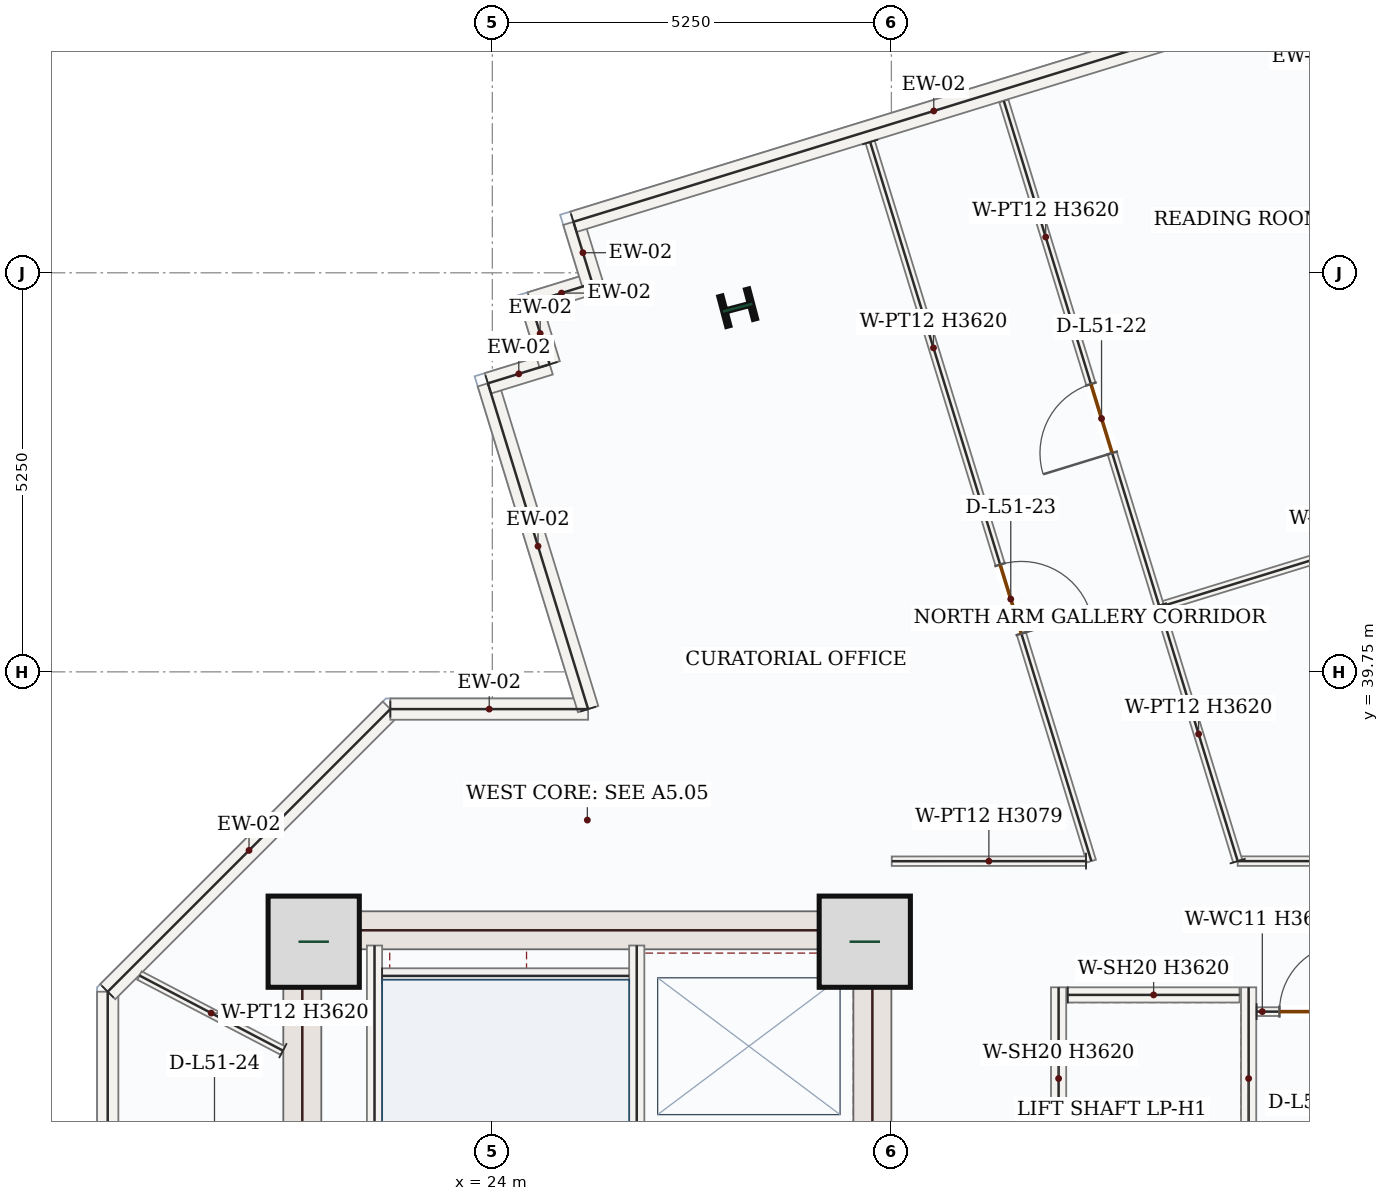
"""IFC4 building model, lengths in metres.
Left out: names, types, materials, properties, quantities, classifications, styles, units other than length and angle.
Written with IfcOpenShell. Run it as: python <this file> out.ifc"""

import sys

from ifc_helpers import new_model, si_unit, direction, frame, frame_2d, origin, origin_2d, place, context, subcontext, project, spatial, rectangle, i_section, extrude, source, transform, mapped, element, fill, save


model = new_model("IFC4")
c1 = context("Model", 3, precision=1e-05, world=origin(), true_north=direction((0.0, 1.0)))
c2 = subcontext(c1, "Body", "Model", "MODEL_VIEW")
j1 = project(units=[si_unit("LENGTHUNIT", "METRE"), si_unit("PLANEANGLEUNIT", "RADIAN")], contexts=[c1])
p1 = place(None, origin())
s1 = spatial("IfcSite", under=j1, at=p1, CompositionType="ELEMENT")
p2 = place(p1, origin())
s2 = spatial("IfcBuilding", under=s1, at=p2, CompositionType="ELEMENT")
p3 = place(p2, frame((0.0, 0.0, 217.5)))
s3 = spatial("IfcBuildingStorey", under=s2, at=p3, CompositionType="ELEMENT", Elevation=217.5)
m1 = source(origin(), c2, "Body", "SweptSolid", [
    extrude(rectangle(XDim=8.55, YDim=0.5, at=frame_2d((4.275, 0.0))), origin(), (0.0, 0.0, 1.0), 3.62),
])
p4 = place(p3, frame((21.5, 28.05, 0.0), z_axis=(0.0, 0.0, 1.0), x_axis=(0.0, 1.0, 0.0)))
e1 = element("IfcWall", 1, at=p4, inside=s3, PredefinedType="SHEAR", context=c2, shape_type="MappedRepresentation", body=[
    mapped(m1, transform((0.0, 0.0, 0.0), x_axis=(1.0, 0.0, 0.0), y_axis=(0.0, 1.0, 0.0), z_axis=(0.0, 0.0, 1.0), scale=1.0)),
])
p5 = place(p3, frame((29.0, 28.05, 0.0), z_axis=(0.0, 0.0, 1.0), x_axis=(0.0, 1.0, 0.0)))
e2 = element("IfcWall", 2, at=p5, inside=s3, PredefinedType="SHEAR", context=c2, shape_type="SweptSolid", body=[
    extrude(rectangle(XDim=8.55, YDim=0.5, at=frame_2d((4.275, 0.0))), origin(), (0.0, 0.0, 1.0), 3.62),
])
p6 = place(p5, frame((1.5, 0.0, 0.0)))
e3 = element("IfcOpeningElement", 3, at=p6, cuts=e2, PredefinedType="OPENING", context=c2, shape_type="SweptSolid", body=[
    extrude(rectangle(XDim=1.1, YDim=2.2, at=frame_2d((0.55, 1.1))), frame((0.0, 0.26, 0.0), z_axis=(0.0, -1.0, 0.0), x_axis=(1.0, 0.0, 0.0)), (0.0, 0.0, 1.0), 0.52),
])
m2 = source(origin(), c2, "Body", "SweptSolid", [
    extrude(rectangle(XDim=7.0, YDim=0.5, at=frame_2d((3.5, 0.0))), origin(), (0.0, 0.0, 1.0), 3.62),
])
p7 = place(p3, frame((21.75, 36.35, 0.0), z_axis=(0.0, 0.0, 1.0), x_axis=(1.0, 0.0, 0.0)))
e4 = element("IfcWall", 4, at=p7, inside=s3, PredefinedType="SHEAR", context=c2, shape_type="MappedRepresentation", body=[
    mapped(m2, transform((0.0, 0.0, 0.0), x_axis=(1.0, 0.0, 0.0), y_axis=(0.0, 1.0, 0.0), z_axis=(0.0, 0.0, 1.0), scale=1.0)),
])
m3 = source(origin(), c2, "Body", "SweptSolid", [
    extrude(rectangle(XDim=1.2, YDim=1.2, at=origin_2d()), origin(), (0.0, 0.0, 1.0), 3.9),
])
for number, where, z_axis, x_axis in (
    (5, (21.65, 36.2, 0.0), (0.0, 0.0, 1.0), (1.0, 0.0, 0.0)),
    (6, (28.9, 36.2, 0.0), (0.0, 0.0, 1.0), (1.0, 0.0, 0.0)),
):
    element("IfcColumn", number, at=place(p3, frame(where, z_axis=z_axis, x_axis=x_axis)), inside=s3, PredefinedType="COLUMN", context=c2, shape_type="MappedRepresentation", body=[
        mapped(m3, transform((0.0, 0.0, 0.0), x_axis=(1.0, 0.0, 0.0), y_axis=(0.0, 1.0, 0.0), z_axis=(0.0, 0.0, 1.0), scale=1.0)),
    ])
m4 = source(origin(), c2, "Body", "SweptSolid", [
    extrude(i_section(OverallWidth=0.404, OverallDepth=0.407, WebThickness=0.027, FlangeThickness=0.044, FilletRadius=0.018, at=origin_2d()), origin(), (0.0, 0.0, 1.0), 3.9),
])
p8 = place(p3, frame((27.228, 44.541, 0.0), z_axis=(0.0, 0.0, 1.0), x_axis=(-0.255445757936, 0.966823388604, 0.0)))
e7 = element("IfcColumn", 7, at=p8, inside=s3, PredefinedType="COLUMN", context=c2, shape_type="MappedRepresentation", body=[
    mapped(m4, transform((0.0, 0.0, 0.0), x_axis=(1.0, 0.0, 0.0), y_axis=(0.0, 1.0, 0.0), z_axis=(0.0, 0.0, 1.0), scale=1.0)),
])
m5 = source(origin(), c2, "Body", "SweptSolid", [
    extrude(rectangle(XDim=6.822, YDim=0.28, at=frame_2d((3.411, 0.0))), origin(), (0.0, 0.0, 1.0), 3.62),
])
p9 = place(p3, frame((18.94, 28.72, 0.0), z_axis=(0.0, 0.0, 1.0), x_axis=(0.0, 1.0, 0.0)))
e8 = element("IfcWall", 8, at=p9, inside=s3, PredefinedType="SOLIDWALL", context=c2, shape_type="MappedRepresentation", body=[
    mapped(m5, transform((0.0, 0.0, 0.0), x_axis=(1.0, 0.0, 0.0), y_axis=(0.0, 1.0, 0.0), z_axis=(0.0, 0.0, 1.0), scale=1.0)),
])
m6 = source(origin(), c2, "Body", "SweptSolid", [
    extrude(rectangle(XDim=5.258, YDim=0.28, at=frame_2d((2.629, 0.0))), origin(), (0.0, 0.0, 1.0), 3.62),
])
p10 = place(p3, frame((18.94, 35.542, 0.0), z_axis=(0.0, 0.0, 1.0), x_axis=(0.707106781187, 0.707106781187, 0.0)))
e9 = element("IfcWall", 9, at=p10, inside=s3, PredefinedType="SOLIDWALL", context=c2, shape_type="MappedRepresentation", body=[
    mapped(m6, transform((0.0, 0.0, 0.0), x_axis=(1.0, 0.0, 0.0), y_axis=(0.0, 1.0, 0.0), z_axis=(0.0, 0.0, 1.0), scale=1.0)),
])
m7 = source(origin(), c2, "Body", "SweptSolid", [
    extrude(rectangle(XDim=2.602, YDim=0.28, at=frame_2d((1.301, 0.0))), origin(), (0.0, 0.0, 1.0), 3.62),
])
p11 = place(p3, frame((22.658, 39.26, 0.0), z_axis=(0.0, 0.0, 1.0), x_axis=(1.0, 0.0, 0.0)))
e10 = element("IfcWall", 10, at=p11, inside=s3, PredefinedType="SOLIDWALL", context=c2, shape_type="MappedRepresentation", body=[
    mapped(m7, transform((0.0, 0.0, 0.0), x_axis=(1.0, 0.0, 0.0), y_axis=(0.0, 1.0, 0.0), z_axis=(0.0, 0.0, 1.0), scale=1.0)),
])
m8 = source(origin(), c2, "Body", "SweptSolid", [
    extrude(rectangle(XDim=4.484, YDim=0.28, at=frame_2d((2.242, 0.0))), origin(), (0.0, 0.0, 1.0), 3.62),
])
p12 = place(p3, frame((25.26, 39.26, 0.0), z_axis=(0.0, 0.0, 1.0), x_axis=(-0.294009328951, 0.95580254995, 0.0)))
e11 = element("IfcWall", 11, at=p12, inside=s3, PredefinedType="SOLIDWALL", context=c2, shape_type="MappedRepresentation", body=[
    mapped(m8, transform((0.0, 0.0, 0.0), x_axis=(1.0, 0.0, 0.0), y_axis=(0.0, 1.0, 0.0), z_axis=(0.0, 0.0, 1.0), scale=1.0)),
])
m9 = source(origin(), c2, "Body", "SweptSolid", [
    extrude(rectangle(XDim=0.85, YDim=0.28, at=frame_2d((0.425, 0.0))), origin(), (0.0, 0.0, 1.0), 3.62),
])
p13 = place(p3, frame((23.942, 43.546, 0.0), z_axis=(0.0, 0.0, 1.0), x_axis=(0.955834897765, 0.293904148005, 0.0)))
e12 = element("IfcWall", 12, at=p13, inside=s3, PredefinedType="SOLIDWALL", context=c2, shape_type="MappedRepresentation", body=[
    mapped(m9, transform((0.0, 0.0, 0.0), x_axis=(1.0, 0.0, 0.0), y_axis=(0.0, 1.0, 0.0), z_axis=(0.0, 0.0, 1.0), scale=1.0)),
])
m10 = source(origin(), c2, "Body", "SweptSolid", [
    extrude(rectangle(XDim=0.85, YDim=0.28, at=frame_2d((0.425, 0.0))), origin(), (0.0, 0.0, 1.0), 3.62),
])
p14 = place(p3, frame((24.754, 43.796, 0.0), z_axis=(0.0, 0.0, 1.0), x_axis=(-0.293823460726, 0.955859704102, 0.0)))
e13 = element("IfcWall", 13, at=p14, inside=s3, PredefinedType="SOLIDWALL", context=c2, shape_type="MappedRepresentation", body=[
    mapped(m10, transform((0.0, 0.0, 0.0), x_axis=(1.0, 0.0, 0.0), y_axis=(0.0, 1.0, 0.0), z_axis=(0.0, 0.0, 1.0), scale=1.0)),
])
p15 = place(p3, frame((24.504, 44.608, 0.0), z_axis=(0.0, 0.0, 1.0), x_axis=(0.95575416016, 0.294166594531, 0.0)))
e14 = element("IfcWall", 14, at=p15, inside=s3, PredefinedType="SOLIDWALL", context=c2, shape_type="MappedRepresentation", body=[
    mapped(m9, transform((0.0, 0.0, 0.0), x_axis=(1.0, 0.0, 0.0), y_axis=(0.0, 1.0, 0.0), z_axis=(0.0, 0.0, 1.0), scale=1.0)),
])
p16 = place(p3, frame((25.317, 44.858, 0.0), z_axis=(0.0, 0.0, 1.0), x_axis=(-0.293823460726, 0.955859704102, 0.0)))
e15 = element("IfcWall", 15, at=p16, inside=s3, PredefinedType="SOLIDWALL", context=c2, shape_type="MappedRepresentation", body=[
    mapped(m10, transform((0.0, 0.0, 0.0), x_axis=(1.0, 0.0, 0.0), y_axis=(0.0, 1.0, 0.0), z_axis=(0.0, 0.0, 1.0), scale=1.0)),
])
m11 = source(origin(), c2, "Body", "SweptSolid", [
    extrude(rectangle(XDim=9.92, YDim=0.28, at=frame_2d((4.96, 0.0))), origin(), (0.0, 0.0, 1.0), 3.62),
])
p17 = place(p3, frame((25.067, 45.671, 0.0), z_axis=(0.0, 0.0, 1.0), x_axis=(0.955796567368, 0.294028777175, 0.0)))
e16 = element("IfcWall", 16, at=p17, inside=s3, PredefinedType="SOLIDWALL", context=c2, shape_type="MappedRepresentation", body=[
    mapped(m11, transform((0.0, 0.0, 0.0), x_axis=(1.0, 0.0, 0.0), y_axis=(0.0, 1.0, 0.0), z_axis=(0.0, 0.0, 1.0), scale=1.0)),
])
p18 = place(p3, frame((34.548, 48.587, 0.0), z_axis=(0.0, 0.0, 1.0), x_axis=(0.293823460726, -0.955859704102, 0.0)))
e17 = element("IfcWall", 17, at=p18, inside=s3, PredefinedType="SOLIDWALL", context=c2, shape_type="MappedRepresentation", body=[
    mapped(m10, transform((0.0, 0.0, 0.0), x_axis=(1.0, 0.0, 0.0), y_axis=(0.0, 1.0, 0.0), z_axis=(0.0, 0.0, 1.0), scale=1.0)),
])
m12 = source(origin(), c2, "Body", "SweptSolid", [
    extrude(rectangle(XDim=7.87, YDim=0.2, at=frame_2d((3.935, 0.0))), origin(), (0.0, 0.0, 1.0), 3.62),
])
p19 = place(p3, frame((22.45, 28.28, 0.0), z_axis=(0.0, 0.0, 1.0), x_axis=(0.0, 1.0, 0.0)))
e18 = element("IfcWall", 18, at=p19, inside=s3, PredefinedType="SOLIDWALL", context=c2, shape_type="MappedRepresentation", body=[
    mapped(m12, transform((0.0, 0.0, 0.0), x_axis=(1.0, 0.0, 0.0), y_axis=(0.0, 1.0, 0.0), z_axis=(0.0, 0.0, 1.0), scale=1.0)),
])
p20 = place(p3, frame((25.9, 28.15, 0.0), z_axis=(0.0, 0.0, 1.0), x_axis=(0.0, 1.0, 0.0)))
e19 = element("IfcWall", 19, at=p20, inside=s3, PredefinedType="SOLIDWALL", context=c2, shape_type="SweptSolid", body=[
    extrude(rectangle(XDim=8.0, YDim=0.2, at=frame_2d((4.0, 0.0))), origin(), (0.0, 0.0, 1.0), 3.62),
])
p21 = place(p20, frame((0.4, 0.0, 0.0)))
e20 = element("IfcOpeningElement", 20, at=p21, cuts=e19, PredefinedType="OPENING", context=c2, shape_type="SweptSolid", body=[
    extrude(rectangle(XDim=1.05, YDim=2.15, at=frame_2d((0.525, 1.075))), frame((0.0, 0.11, 0.0), z_axis=(0.0, -1.0, 0.0), x_axis=(1.0, 0.0, 0.0)), (0.0, 0.0, 1.0), 0.22),
])
m13 = source(origin(), c2, "Body", "SweptSolid", [
    extrude(rectangle(XDim=3.25, YDim=0.2, at=frame_2d((1.625, 0.0))), origin(), (0.0, 0.0, 1.0), 3.62),
])
p22 = place(p3, frame((22.55, 35.75, 0.0), z_axis=(0.0, 0.0, 1.0), x_axis=(1.0, 0.0, 0.0)))
e21 = element("IfcWall", 21, at=p22, inside=s3, PredefinedType="SOLIDWALL", context=c2, shape_type="MappedRepresentation", body=[
    mapped(m13, transform((0.0, 0.0, 0.0), x_axis=(1.0, 0.0, 0.0), y_axis=(0.0, 1.0, 0.0), z_axis=(0.0, 0.0, 1.0), scale=1.0)),
])
m14 = source(origin(), c2, "Body", "SweptSolid", [
    extrude(rectangle(XDim=2.4, YDim=0.2, at=frame_2d((1.2, 0.0))), origin(), (0.0, 0.0, 1.0), 3.62),
])
for number, where, z_axis, x_axis in (
    (22, (31.45, 33.2, 0.0), (0.0, 0.0, 1.0), (0.0, 1.0, 0.0)),
    (23, (33.95, 33.2, 0.0), (0.0, 0.0, 1.0), (0.0, 1.0, 0.0)),
):
    element("IfcWall", number, at=place(p3, frame(where, z_axis=z_axis, x_axis=x_axis)), inside=s3, PredefinedType="SOLIDWALL", context=c2, shape_type="MappedRepresentation", body=[
        mapped(m14, transform((0.0, 0.0, 0.0), x_axis=(1.0, 0.0, 0.0), y_axis=(0.0, 1.0, 0.0), z_axis=(0.0, 0.0, 1.0), scale=1.0)),
    ])
m15 = source(origin(), c2, "Body", "SweptSolid", [
    extrude(rectangle(XDim=2.26, YDim=0.2, at=frame_2d((1.13, 0.0))), origin(), (0.0, 0.0, 1.0), 3.62),
])
p23 = place(p3, frame((31.57, 35.5, 0.0), z_axis=(0.0, 0.0, 1.0), x_axis=(1.0, 0.0, 0.0)))
e24 = element("IfcWall", 24, at=p23, inside=s3, PredefinedType="SOLIDWALL", context=c2, shape_type="MappedRepresentation", body=[
    mapped(m15, transform((0.0, 0.0, 0.0), x_axis=(1.0, 0.0, 0.0), y_axis=(0.0, 1.0, 0.0), z_axis=(0.0, 0.0, 1.0), scale=1.0)),
])
p24 = place(p3, frame((34.055, 35.28, 0.0), z_axis=(0.0, 0.0, 1.0), x_axis=(1.0, 0.0, 0.0)))
e25 = element("IfcWall", 25, at=p24, inside=s3, PredefinedType="PARTITIONING", context=c2, shape_type="SweptSolid", body=[
    extrude(rectangle(XDim=1.285, YDim=0.115, at=frame_2d((0.643, 0.0))), origin(), (0.0, 0.0, 1.0), 3.62),
])
p25 = place(p24, frame((0.3, 0.0, 0.0)))
e26 = element("IfcOpeningElement", 26, at=p25, cuts=e25, PredefinedType="OPENING", context=c2, shape_type="SweptSolid", body=[
    extrude(rectangle(XDim=0.9, YDim=2.1, at=frame_2d((0.45, 1.05))), frame((0.0, 0.067, 0.0), z_axis=(0.0, -1.0, 0.0), x_axis=(1.0, 0.0, 0.0)), (0.0, 0.0, 1.0), 0.135),
])
p26 = place(p3, frame((41.51, 37.26, 0.0), z_axis=(0.0, 0.0, 1.0), x_axis=(-1.0, 0.0, 0.0)))
e27 = element("IfcWall", 27, at=p26, inside=s3, PredefinedType="PARTITIONING", context=c2, shape_type="SweptSolid", body=[
    extrude(rectangle(XDim=7.704, YDim=0.125, at=frame_2d((3.852, 0.0))), origin(), (0.0, 0.0, 1.0), 3.62),
])
p27 = place(p26, frame((5.268, 0.0, 0.0)))
e28 = element("IfcOpeningElement", 28, at=p27, cuts=e27, PredefinedType="OPENING", context=c2, shape_type="SweptSolid", body=[
    extrude(rectangle(XDim=0.95, YDim=2.15, at=frame_2d((0.475, 1.075))), frame((0.0, 0.073, 0.0), z_axis=(0.0, -1.0, 0.0), x_axis=(1.0, 0.0, 0.0)), (0.0, 0.0, 1.0), 0.145),
])
m16 = source(origin(), c2, "Body", "SweptSolid", [
    extrude(rectangle(XDim=3.498, YDim=0.125, at=frame_2d((1.749, 0.0))), origin(), (0.0, 0.0, 1.0), 3.62),
])
p28 = place(p3, frame((33.806, 37.26, 0.0), z_axis=(0.0, 0.0, 1.0), x_axis=(-0.294012288782, 0.955801639487, 0.0)))
e29 = element("IfcWall", 29, at=p28, inside=s3, PredefinedType="PARTITIONING", context=c2, shape_type="MappedRepresentation", body=[
    mapped(m16, transform((0.0, 0.0, 0.0), x_axis=(1.0, 0.0, 0.0), y_axis=(0.0, 1.0, 0.0), z_axis=(0.0, 0.0, 1.0), scale=1.0)),
])
m17 = source(origin(), c2, "Body", "SweptSolid", [
    extrude(rectangle(XDim=5.595, YDim=0.125, at=frame_2d((2.797, 0.0))), origin(), (0.0, 0.0, 1.0), 3.62),
])
p29 = place(p3, frame((32.778, 40.604, 0.0), z_axis=(0.0, 0.0, 1.0), x_axis=(0.955787499516, 0.294058252339, 0.0)))
e30 = element("IfcWall", 30, at=p29, inside=s3, PredefinedType="PARTITIONING", context=c2, shape_type="MappedRepresentation", body=[
    mapped(m17, transform((0.0, 0.0, 0.0), x_axis=(1.0, 0.0, 0.0), y_axis=(0.0, 1.0, 0.0), z_axis=(0.0, 0.0, 1.0), scale=1.0)),
])
p30 = place(p3, frame((32.771, 40.623, 0.0), z_axis=(0.0, 0.0, 1.0), x_axis=(-0.294016682873, 0.955800287818, 0.0)))
e31 = element("IfcWall", 31, at=p30, inside=s3, PredefinedType="PARTITIONING", context=c2, shape_type="SweptSolid", body=[
    extrude(rectangle(XDim=6.945, YDim=0.125, at=frame_2d((3.473, 0.0))), origin(), (0.0, 0.0, 1.0), 3.62),
])
p31 = place(p30, frame((2.098, 0.0, 0.0)))
e32 = element("IfcOpeningElement", 32, at=p31, cuts=e31, PredefinedType="OPENING", context=c2, shape_type="SweptSolid", body=[
    extrude(rectangle(XDim=0.95, YDim=2.15, at=frame_2d((0.475, 1.075))), frame((0.0, 0.073, 0.0), z_axis=(0.0, -1.0, 0.0), x_axis=(1.0, 0.0, 0.0)), (0.0, 0.0, 1.0), 0.145),
])
p32 = place(p3, frame((28.971, 46.72, 0.0), z_axis=(0.0, 0.0, 1.0), x_axis=(0.294052915152, -0.955789141542, 0.0)))
e33 = element("IfcWall", 33, at=p32, inside=s3, PredefinedType="PARTITIONING", context=c2, shape_type="SweptSolid", body=[
    extrude(rectangle(XDim=9.897, YDim=0.125, at=frame_2d((4.949, 0.0))), origin(), (0.0, 0.0, 1.0), 3.62),
])
p33 = place(p32, frame((5.816, 0.0, 0.0)))
e34 = element("IfcOpeningElement", 34, at=p33, cuts=e33, PredefinedType="OPENING", context=c2, shape_type="SweptSolid", body=[
    extrude(rectangle(XDim=0.95, YDim=2.15, at=frame_2d((0.475, 1.075))), frame((0.0, 0.073, 0.0), z_axis=(0.0, -1.0, 0.0), x_axis=(1.0, 0.0, 0.0)), (0.0, 0.0, 1.0), 0.145),
])
m18 = source(origin(), c2, "Body", "SweptSolid", [
    extrude(rectangle(XDim=2.555, YDim=0.125, at=frame_2d((1.278, 0.0))), origin(), (0.0, 0.0, 1.0), 3.079),
])
p34 = place(p3, frame((31.81, 37.26, 0.0), z_axis=(0.0, 0.0, 1.0), x_axis=(-0.999999885905, -0.000477691739, 0.0)))
e35 = element("IfcWall", 35, at=p34, inside=s3, PredefinedType="PARTITIONING", context=c2, shape_type="MappedRepresentation", body=[
    mapped(m18, transform((0.0, 0.0, 0.0), x_axis=(1.0, 0.0, 0.0), y_axis=(0.0, 1.0, 0.0), z_axis=(0.0, 0.0, 1.0), scale=1.0)),
])
m19 = source(origin(), c2, "Body", "SweptSolid", [
    extrude(rectangle(XDim=2.13, YDim=0.125, at=frame_2d((1.065, 0.0))), origin(), (0.0, 0.0, 1.0), 3.62),
])
p35 = place(p3, frame((21.245, 34.767, 0.0), z_axis=(0.0, 0.0, 1.0), x_axis=(-0.885975067717, 0.46373287503, 0.0)))
e36 = element("IfcWall", 36, at=p35, inside=s3, PredefinedType="PARTITIONING", context=c2, shape_type="MappedRepresentation", body=[
    mapped(m19, transform((0.0, 0.0, 0.0), x_axis=(1.0, 0.0, 0.0), y_axis=(0.0, 1.0, 0.0), z_axis=(0.0, 0.0, 1.0), scale=1.0)),
])
m20 = source(origin(), c2, "Body", "SweptSolid", [
    extrude(rectangle(XDim=0.9, YDim=2.1, at=frame_2d((0.45, 1.05))), frame((0.0, 0.025, 0.0), z_axis=(0.0, -1.0, 0.0), x_axis=(1.0, 0.0, 0.0)), (0.0, 0.0, 1.0), 0.05),
])
p36 = place(p25, origin())
e37 = element("IfcDoor", 37, at=p36, inside=s3, OperationType="SINGLE_SWING_RIGHT", PredefinedType="DOOR", context=c2, shape_type="MappedRepresentation", body=[
    mapped(m20, transform((0.0, 0.0, 0.0), x_axis=(1.0, 0.0, 0.0), y_axis=(0.0, 1.0, 0.0), z_axis=(0.0, 0.0, 1.0), scale=1.0)),
])
fill(e26, e37)
m21 = source(origin(), c2, "Body", "SweptSolid", [
    extrude(rectangle(XDim=0.95, YDim=2.15, at=frame_2d((0.475, 1.075))), frame((0.0, 0.025, 0.0), z_axis=(0.0, -1.0, 0.0), x_axis=(1.0, 0.0, 0.0)), (0.0, 0.0, 1.0), 0.05),
])
p37 = place(p31, origin())
e38 = element("IfcDoor", 38, at=p37, inside=s3, OperationType="SINGLE_SWING_LEFT", PredefinedType="DOOR", context=c2, shape_type="MappedRepresentation", body=[
    mapped(m21, transform((0.0, 0.0, 0.0), x_axis=(1.0, 0.0, 0.0), y_axis=(0.0, 1.0, 0.0), z_axis=(0.0, 0.0, 1.0), scale=1.0)),
])
fill(e32, e38)
p38 = place(p33, origin())
e39 = element("IfcDoor", 39, at=p38, inside=s3, OperationType="SINGLE_SWING_RIGHT", PredefinedType="DOOR", context=c2, shape_type="MappedRepresentation", body=[
    mapped(m21, transform((0.0, 0.0, 0.0), x_axis=(1.0, 0.0, 0.0), y_axis=(0.0, 1.0, 0.0), z_axis=(0.0, 0.0, 1.0), scale=1.0)),
])
fill(e34, e39)
save(model, sys.argv[1])
